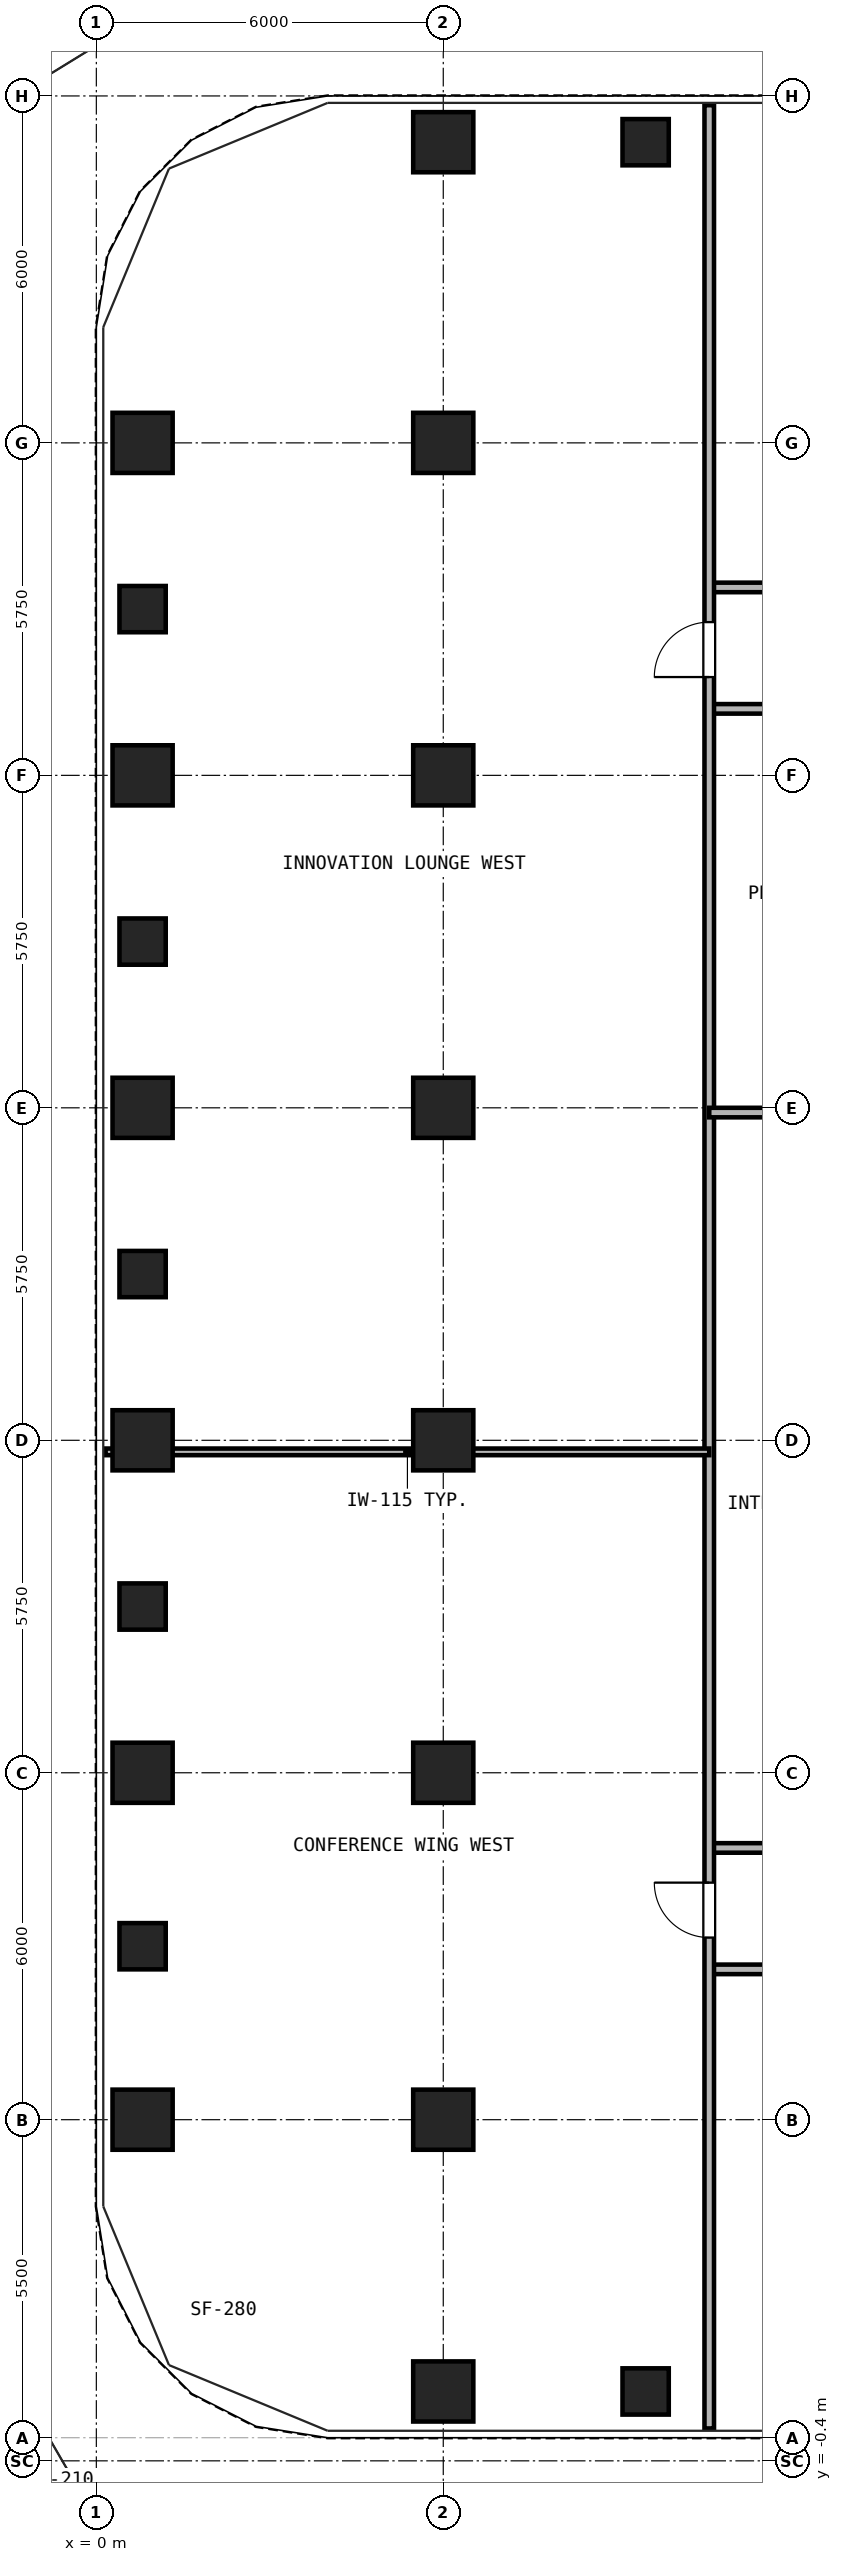
"""IFC4 building model, lengths in metres.
Left out: names, types, materials, properties, quantities, classifications, styles, units other than length and angle.
Written with IfcOpenShell. Run it as: python <this file> out.ifc"""

import sys

from ifc_helpers import new_model, si_unit, direction, frame, frame_2d, origin, origin_2d, place, context, subcontext, project, spatial, rectangle, hollow_rectangle, extrude, source, transform, mapped, element, fill, save


model = new_model("IFC4")
c1 = context("Model", 3, precision=1e-05, world=origin(), true_north=direction((0.0, 1.0)))
c2 = subcontext(c1, "Body", "Model", "MODEL_VIEW")
j1 = project(units=[si_unit("LENGTHUNIT", "METRE"), si_unit("PLANEANGLEUNIT", "RADIAN")], contexts=[c1])
p1 = place(None, origin())
s1 = spatial("IfcSite", under=j1, at=p1, CompositionType="ELEMENT")
p2 = place(p1, origin())
s2 = spatial("IfcBuilding", under=s1, at=p2, CompositionType="ELEMENT")
p3 = place(p2, frame((0.0, 0.0, 44.1)))
s3 = spatial("IfcBuildingStorey", under=s2, at=p3, CompositionType="ELEMENT", Elevation=44.1)
m1 = source(origin(), c2, "Body", "SweptSolid", [
    extrude(hollow_rectangle(XDim=1.04, YDim=1.04, WallThickness=0.065, at=origin_2d()), origin(), (0.0, 0.0, 1.0), 3.32),
])
for number, where, z_axis, x_axis in (
    (1, (6.0, 0.8, 0.0), (0.0, 0.0, 1.0), (1.0, 0.0, 0.0)),
    (2, (6.0, 39.7, 0.0), (0.0, 0.0, 1.0), (1.0, 0.0, 0.0)),
    (3, (0.8, 5.5, 0.0), (0.0, 0.0, 1.0), (1.0, 0.0, 0.0)),
    (4, (0.8, 11.5, 0.0), (0.0, 0.0, 1.0), (1.0, 0.0, 0.0)),
    (5, (0.8, 17.25, 0.0), (0.0, 0.0, 1.0), (1.0, 0.0, 0.0)),
    (6, (0.8, 23.0, 0.0), (0.0, 0.0, 1.0), (1.0, 0.0, 0.0)),
    (7, (0.8, 28.75, 0.0), (0.0, 0.0, 1.0), (1.0, 0.0, 0.0)),
    (8, (0.8, 34.5, 0.0), (0.0, 0.0, 1.0), (1.0, 0.0, 0.0)),
    (9, (6.0, 5.5, 0.0), (0.0, 0.0, 1.0), (1.0, 0.0, 0.0)),
    (10, (6.0, 11.5, 0.0), (0.0, 0.0, 1.0), (1.0, 0.0, 0.0)),
    (11, (6.0, 17.25, 0.0), (0.0, 0.0, 1.0), (1.0, 0.0, 0.0)),
    (12, (6.0, 23.0, 0.0), (0.0, 0.0, 1.0), (1.0, 0.0, 0.0)),
    (13, (6.0, 28.75, 0.0), (0.0, 0.0, 1.0), (1.0, 0.0, 0.0)),
    (14, (6.0, 34.5, 0.0), (0.0, 0.0, 1.0), (1.0, 0.0, 0.0)),
):
    element("IfcColumn", number, at=place(p3, frame(where, z_axis=z_axis, x_axis=x_axis)), inside=s3, PredefinedType="COLUMN", context=c2, shape_type="MappedRepresentation", body=[
        mapped(m1, transform((0.0, 0.0, 0.0), x_axis=(1.0, 0.0, 0.0), y_axis=(0.0, 1.0, 0.0), z_axis=(0.0, 0.0, 1.0), scale=1.0)),
    ])
m2 = source(origin(), c2, "Body", "SweptSolid", [
    extrude(hollow_rectangle(XDim=0.8, YDim=0.8, WallThickness=0.045, at=origin_2d()), origin(), (0.0, 0.0, 1.0), 3.32),
])
for number, where, z_axis, x_axis in (
    (15, (9.5, 0.8, 0.0), (0.0, 0.0, 1.0), (1.0, 0.0, 0.0)),
    (16, (9.5, 39.7, 0.0), (0.0, 0.0, 1.0), (1.0, 0.0, 0.0)),
    (17, (0.8, 8.5, 0.0), (0.0, 0.0, 1.0), (1.0, 0.0, 0.0)),
    (18, (0.8, 14.375, 0.0), (0.0, 0.0, 1.0), (1.0, 0.0, 0.0)),
    (19, (0.8, 20.125, 0.0), (0.0, 0.0, 1.0), (1.0, 0.0, 0.0)),
    (20, (0.8, 25.875, 0.0), (0.0, 0.0, 1.0), (1.0, 0.0, 0.0)),
    (21, (0.8, 31.625, 0.0), (0.0, 0.0, 1.0), (1.0, 0.0, 0.0)),
):
    element("IfcColumn", number, at=place(p3, frame(where, z_axis=z_axis, x_axis=x_axis)), inside=s3, PredefinedType="COLUMN", context=c2, shape_type="MappedRepresentation", body=[
        mapped(m2, transform((0.0, 0.0, 0.0), x_axis=(1.0, 0.0, 0.0), y_axis=(0.0, 1.0, 0.0), z_axis=(0.0, 0.0, 1.0), scale=1.0)),
    ])
p4 = place(p3, frame((10.6, 8.1, 0.0), z_axis=(0.0, 0.0, 1.0), x_axis=(1.0, 0.0, 0.0)))
e22 = element("IfcWall", 22, at=p4, inside=s3, PredefinedType="PARTITIONING", context=c2, shape_type="SweptSolid", body=[
    extrude(rectangle(XDim=25.8, YDim=0.165, at=frame_2d((12.9, 0.0))), origin(), (0.0, 0.0, 1.0), 3.32),
])
p5 = place(p4, frame((7.2, 0.0, 0.0)))
e23 = element("IfcOpeningElement", 23, at=p5, cuts=e22, PredefinedType="OPENING", context=c2, shape_type="SweptSolid", body=[
    extrude(rectangle(XDim=0.95, YDim=2.15, at=frame_2d((0.475, 1.075))), frame((0.0, 0.093, 0.0), z_axis=(0.0, -1.0, 0.0), x_axis=(1.0, 0.0, 0.0)), (0.0, 0.0, 1.0), 0.185),
])
p6 = place(p4, frame((17.65, 0.0, 0.0)))
e24 = element("IfcOpeningElement", 24, at=p6, cuts=e22, PredefinedType="OPENING", context=c2, shape_type="SweptSolid", body=[
    extrude(rectangle(XDim=0.95, YDim=2.15, at=frame_2d((0.475, 1.075))), frame((0.0, 0.093, 0.0), z_axis=(0.0, -1.0, 0.0), x_axis=(1.0, 0.0, 0.0)), (0.0, 0.0, 1.0), 0.185),
])
p7 = place(p4, frame((21.75, 0.0, 0.0)))
e25 = element("IfcOpeningElement", 25, at=p7, cuts=e22, PredefinedType="OPENING", context=c2, shape_type="SweptSolid", body=[
    extrude(rectangle(XDim=0.95, YDim=2.15, at=frame_2d((0.475, 1.075))), frame((0.0, 0.093, 0.0), z_axis=(0.0, -1.0, 0.0), x_axis=(1.0, 0.0, 0.0)), (0.0, 0.0, 1.0), 0.185),
])
p8 = place(p4, frame((24.2, 0.0, 0.0)))
e26 = element("IfcOpeningElement", 26, at=p8, cuts=e22, PredefinedType="OPENING", context=c2, shape_type="SweptSolid", body=[
    extrude(rectangle(XDim=0.92, YDim=2.1, at=frame_2d((0.46, 1.05))), frame((0.0, 0.093, 0.0), z_axis=(0.0, -1.0, 0.0), x_axis=(1.0, 0.0, 0.0)), (0.0, 0.0, 1.0), 0.185),
])
p9 = place(p3, frame((10.6, 32.0, 0.0), z_axis=(0.0, 0.0, 1.0), x_axis=(1.0, 0.0, 0.0)))
e27 = element("IfcWall", 27, at=p9, inside=s3, PredefinedType="PARTITIONING", context=c2, shape_type="SweptSolid", body=[
    extrude(rectangle(XDim=25.8, YDim=0.165, at=frame_2d((12.9, 0.0))), origin(), (0.0, 0.0, 1.0), 3.32),
])
p10 = place(p9, frame((3.45, 0.0, 0.0)))
e28 = element("IfcOpeningElement", 28, at=p10, cuts=e27, PredefinedType="OPENING", context=c2, shape_type="SweptSolid", body=[
    extrude(rectangle(XDim=0.95, YDim=2.15, at=frame_2d((0.475, 1.075))), frame((0.0, 0.093, 0.0), z_axis=(0.0, -1.0, 0.0), x_axis=(1.0, 0.0, 0.0)), (0.0, 0.0, 1.0), 0.185),
])
p11 = place(p9, frame((10.9, 0.0, 0.0)))
e29 = element("IfcOpeningElement", 29, at=p11, cuts=e27, PredefinedType="OPENING", context=c2, shape_type="SweptSolid", body=[
    extrude(rectangle(XDim=0.95, YDim=2.15, at=frame_2d((0.475, 1.075))), frame((0.0, 0.093, 0.0), z_axis=(0.0, -1.0, 0.0), x_axis=(1.0, 0.0, 0.0)), (0.0, 0.0, 1.0), 0.185),
])
p12 = place(p9, frame((19.85, 0.0, 0.0)))
e30 = element("IfcOpeningElement", 30, at=p12, cuts=e27, PredefinedType="OPENING", context=c2, shape_type="SweptSolid", body=[
    extrude(rectangle(XDim=0.95, YDim=2.15, at=frame_2d((0.475, 1.075))), frame((0.0, 0.093, 0.0), z_axis=(0.0, -1.0, 0.0), x_axis=(1.0, 0.0, 0.0)), (0.0, 0.0, 1.0), 0.185),
])
for number, where, z_axis, x_axis in (
    (31, (10.6, 10.2, 0.0), (0.0, 0.0, 1.0), (1.0, 0.0, 0.0)),
    (32, (10.6, 29.9, 0.0), (0.0, 0.0, 1.0), (1.0, 0.0, 0.0)),
):
    element("IfcWall", number, at=place(p3, frame(where, z_axis=z_axis, x_axis=x_axis)), inside=s3, PredefinedType="PARTITIONING", context=c2, shape_type="SweptSolid", body=[
        extrude(rectangle(XDim=5.7, YDim=0.165, at=frame_2d((2.85, 0.0))), origin(), (0.0, 0.0, 1.0), 3.32),
    ])
p13 = place(p3, frame((10.6, 0.16, 0.0), z_axis=(0.0, 0.0, 1.0), x_axis=(0.0, 1.0, 0.0)))
e33 = element("IfcWall", 33, at=p13, inside=s3, PredefinedType="PARTITIONING", context=c2, shape_type="SweptSolid", body=[
    extrude(rectangle(XDim=40.18, YDim=0.165, at=frame_2d((20.09, 0.0))), origin(), (0.0, 0.0, 1.0), 3.32),
])
p14 = place(p13, frame((8.49, 0.0, 0.0)))
e34 = element("IfcOpeningElement", 34, at=p14, cuts=e33, PredefinedType="OPENING", context=c2, shape_type="SweptSolid", body=[
    extrude(rectangle(XDim=0.95, YDim=2.15, at=frame_2d((0.475, 1.075))), frame((0.0, 0.093, 0.0), z_axis=(0.0, -1.0, 0.0), x_axis=(1.0, 0.0, 0.0)), (0.0, 0.0, 1.0), 0.185),
])
p15 = place(p13, frame((30.29, 0.0, 0.0)))
e35 = element("IfcOpeningElement", 35, at=p15, cuts=e33, PredefinedType="OPENING", context=c2, shape_type="SweptSolid", body=[
    extrude(rectangle(XDim=0.95, YDim=2.15, at=frame_2d((0.475, 1.075))), frame((0.0, 0.093, 0.0), z_axis=(0.0, -1.0, 0.0), x_axis=(1.0, 0.0, 0.0)), (0.0, 0.0, 1.0), 0.185),
])
p16 = place(p3, frame((0.16, 17.05, 0.0), z_axis=(0.0, 0.0, 1.0), x_axis=(1.0, 0.0, 0.0)))
e36 = element("IfcWall", 36, at=p16, inside=s3, PredefinedType="PARTITIONING", context=c2, shape_type="SweptSolid", body=[
    extrude(rectangle(XDim=10.44, YDim=0.115, at=frame_2d((5.22, 0.0))), origin(), (0.0, 0.0, 1.0), 2.539),
])
p17 = place(p3, frame((10.6, 22.918, 0.0), z_axis=(0.0, 0.0, 1.0), x_axis=(1.0, 0.0, 0.0)))
e37 = element("IfcWall", 37, at=p17, inside=s3, PredefinedType="PARTITIONING", context=c2, shape_type="SweptSolid", body=[
    extrude(rectangle(XDim=5.7, YDim=0.165, at=frame_2d((2.85, 0.0))), origin(), (0.0, 0.0, 1.0), 2.539),
])
p18 = place(p14, frame((0.95, 0.0, 0.0), z_axis=(0.0, 0.0, 1.0), x_axis=(-1.0, 0.0, 0.0)))
e38 = element("IfcDoor", 38, at=p18, inside=s3, OperationType="SINGLE_SWING_RIGHT", PredefinedType="DOOR", context=c2, shape_type="SweptSolid", body=[
    extrude(rectangle(XDim=0.95, YDim=2.15, at=frame_2d((0.475, 1.075))), frame((0.0, 0.025, 0.0), z_axis=(0.0, -1.0, 0.0), x_axis=(1.0, 0.0, 0.0)), (0.0, 0.0, 1.0), 0.05),
])
fill(e34, e38)
p19 = place(p15, frame((0.95, 0.0, 0.0), z_axis=(0.0, 0.0, 1.0), x_axis=(-1.0, 0.0, 0.0)))
e39 = element("IfcDoor", 39, at=p19, inside=s3, OperationType="SINGLE_SWING_LEFT", PredefinedType="DOOR", context=c2, shape_type="SweptSolid", body=[
    extrude(rectangle(XDim=0.95, YDim=2.15, at=frame_2d((0.475, 1.075))), frame((0.0, 0.025, 0.0), z_axis=(0.0, -1.0, 0.0), x_axis=(1.0, 0.0, 0.0)), (0.0, 0.0, 1.0), 0.05),
])
fill(e35, e39)
save(model, sys.argv[1])
